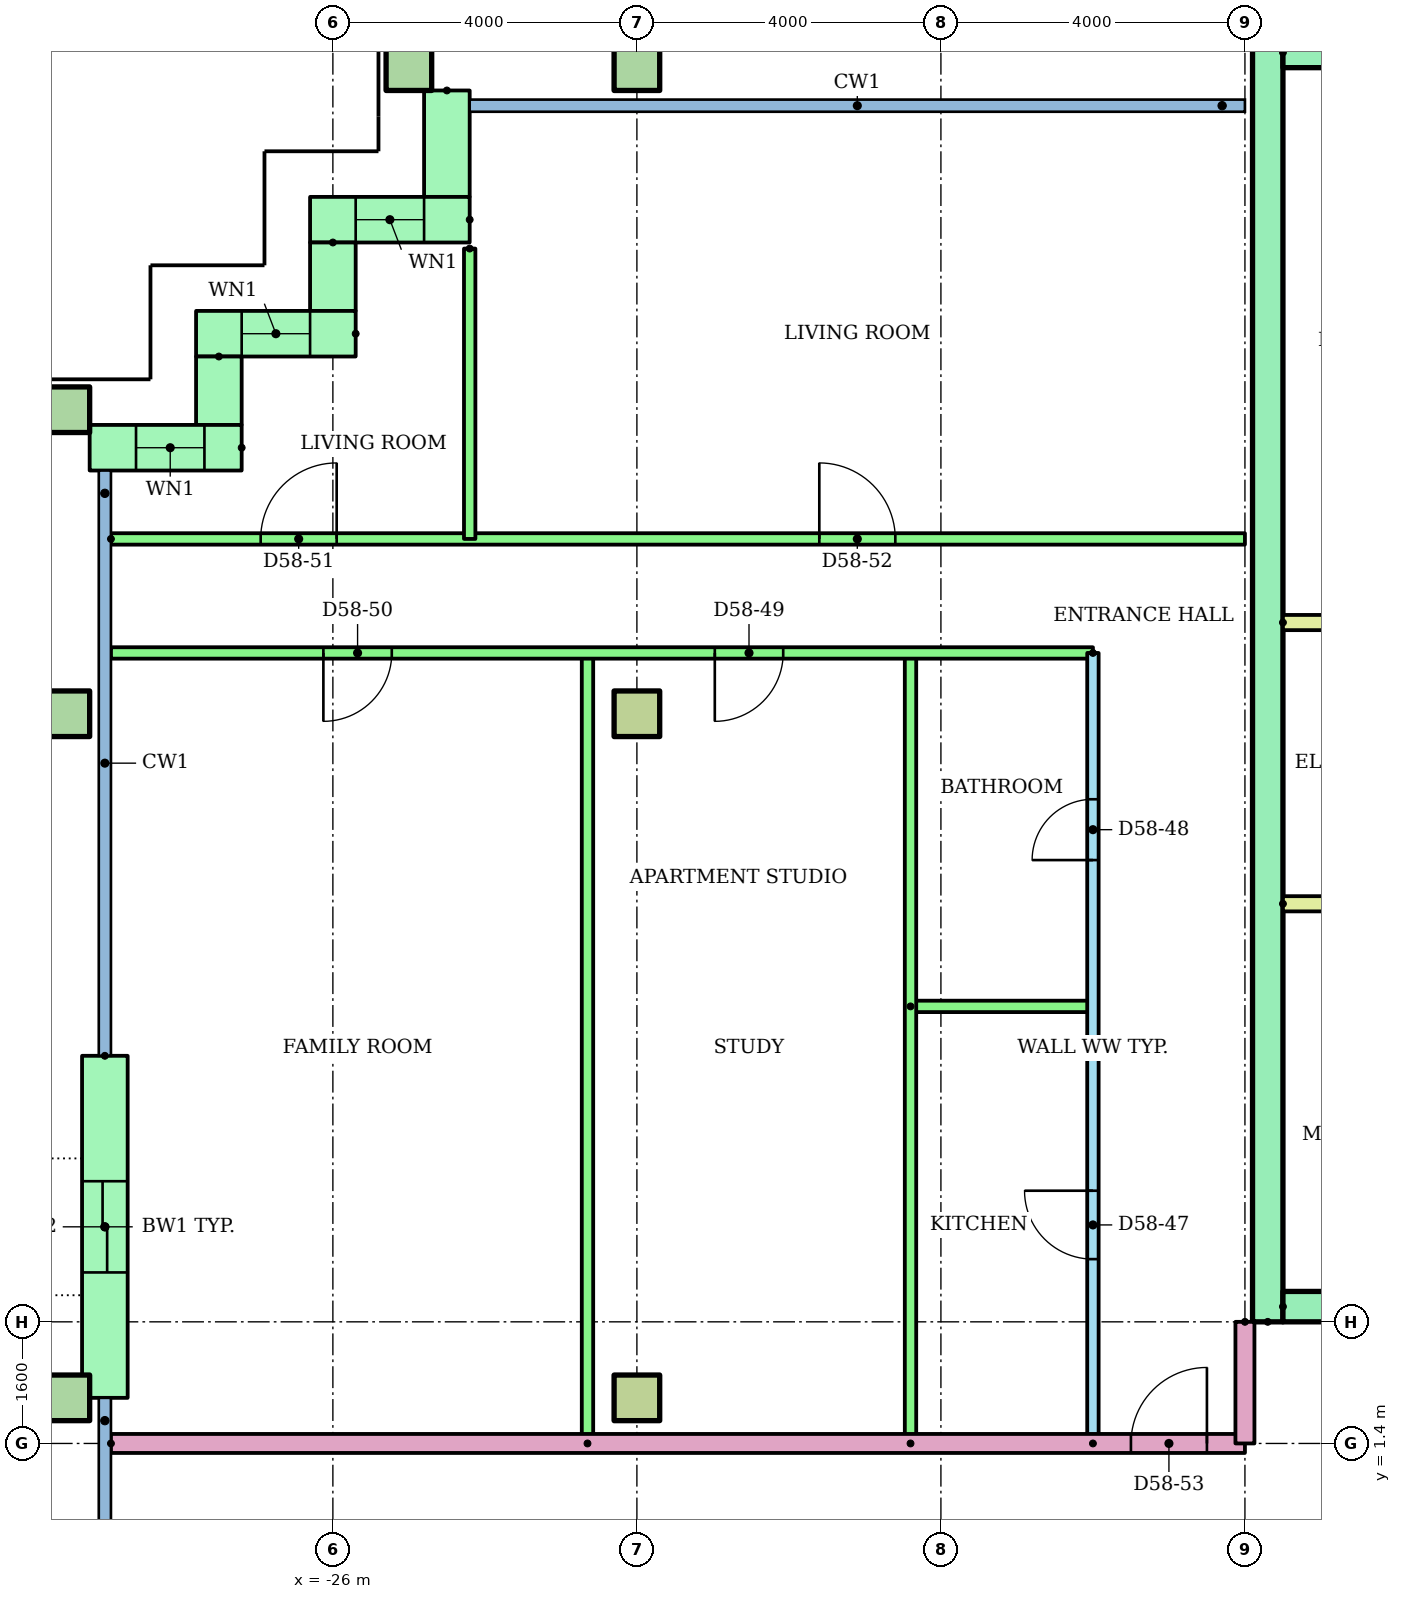
"""IFC4 building model, lengths in metres.
Left out: names, types, materials, properties, quantities, classifications, styles, units other than length and angle.
Written with IfcOpenShell. Run it as: python <this file> out.ifc"""

import sys

from ifc_helpers import new_model, si_unit, direction, frame, frame_2d, origin, origin_2d, place, context, subcontext, project, spatial, rectangle, hollow_rectangle, extrude, element, fill, save


model = new_model("IFC4")
c1 = context("Model", 3, precision=1e-05, world=origin(), true_north=direction((0.0, 1.0)))
c2 = subcontext(c1, "Body", "Model", "MODEL_VIEW")
j1 = project(units=[si_unit("LENGTHUNIT", "METRE"), si_unit("PLANEANGLEUNIT", "RADIAN")], contexts=[c1])
p1 = place(None, origin())
s1 = spatial("IfcSite", under=j1, at=p1, CompositionType="ELEMENT")
p2 = place(p1, origin())
s2 = spatial("IfcBuilding", under=s1, at=p2, CompositionType="ELEMENT")
p3 = place(p2, frame((0.0, 0.0, 223.6)))
s3 = spatial("IfcBuildingStorey", under=s2, at=p3, CompositionType="ELEMENT", Elevation=223.6)
p4 = place(p3, frame((-29.5, 2.0, 0.0)))
e1 = element("IfcColumn", 1, at=p4, inside=s3, PredefinedType="COLUMN", context=c2, shape_type="SweptSolid", body=[
    extrude(hollow_rectangle(XDim=0.6, YDim=0.6, WallThickness=0.03, at=origin_2d()), origin(), (0.0, 0.0, 1.0), 3.2),
])
p5 = place(p3, frame((-22.0, 2.0, 0.0)))
e2 = element("IfcColumn", 2, at=p5, inside=s3, PredefinedType="COLUMN", context=c2, shape_type="SweptSolid", body=[
    extrude(rectangle(XDim=0.6, YDim=0.6, at=origin_2d()), origin(), (0.0, 0.0, 1.0), 3.2),
])
p6 = place(p3, frame((-29.5, 11.0, 0.0)))
e3 = element("IfcColumn", 3, at=p6, inside=s3, PredefinedType="COLUMN", context=c2, shape_type="SweptSolid", body=[
    extrude(hollow_rectangle(XDim=0.6, YDim=0.6, WallThickness=0.03, at=origin_2d()), origin(), (0.0, 0.0, 1.0), 3.2),
])
p7 = place(p3, frame((-22.0, 11.0, 0.0)))
e4 = element("IfcColumn", 4, at=p7, inside=s3, PredefinedType="COLUMN", context=c2, shape_type="SweptSolid", body=[
    extrude(rectangle(XDim=0.6, YDim=0.6, at=origin_2d()), origin(), (0.0, 0.0, 1.0), 3.2),
])
for number, where in (
    (5, (-29.5, 15.0, 0.0)),
    (6, (-25.0, 19.5, 0.0)),
    (7, (-22.0, 19.5, 0.0)),
):
    element("IfcColumn", number, at=place(p3, frame(where)), inside=s3, PredefinedType="COLUMN", context=c2, shape_type="SweptSolid", body=[
        extrude(hollow_rectangle(XDim=0.6, YDim=0.6, WallThickness=0.03, at=origin_2d()), origin(), (0.0, 0.0, 1.0), 3.2),
    ])
p8 = place(p3, frame((-24.5, 19.2, 0.0), z_axis=(0.0, 0.0, 1.0), x_axis=(0.0, -1.0, 0.0)))
e8 = element("IfcWall", 8, at=p8, inside=s3, PredefinedType="STANDARD", context=c2, shape_type="SweptSolid", body=[
    extrude(rectangle(XDim=1.4, YDim=0.6, at=frame_2d((0.7, 0.0))), origin(), (0.0, 0.0, 1.0), 2.92),
])
p9 = place(p3, frame((-24.2, 17.5, 0.0), z_axis=(0.0, 0.0, 1.0), x_axis=(-1.0, 0.0, 0.0)))
e9 = element("IfcWall", 9, at=p9, inside=s3, PredefinedType="STANDARD", context=c2, shape_type="SweptSolid", body=[
    extrude(rectangle(XDim=2.1, YDim=0.6, at=frame_2d((1.05, 0.0))), origin(), (0.0, 0.0, 1.0), 2.92),
])
p10 = place(p9, frame((0.6, 0.0, 0.9)))
e10 = element("IfcOpeningElement", 10, at=p10, cuts=e9, PredefinedType="OPENING", context=c2, shape_type="SweptSolid", body=[
    extrude(rectangle(XDim=0.9, YDim=1.5, at=frame_2d((0.45, 0.75))), frame((0.0, 0.31, 0.0), z_axis=(0.0, -1.0, 0.0), x_axis=(1.0, 0.0, 0.0)), (0.0, 0.0, 1.0), 0.62),
])
p11 = place(p3, frame((-26.0, 17.2, 0.0), z_axis=(0.0, 0.0, 1.0), x_axis=(0.0, -1.0, 0.0)))
e11 = element("IfcWall", 11, at=p11, inside=s3, PredefinedType="STANDARD", context=c2, shape_type="SweptSolid", body=[
    extrude(rectangle(XDim=0.9, YDim=0.6, at=frame_2d((0.45, 0.0))), origin(), (0.0, 0.0, 1.0), 2.92),
])
p12 = place(p3, frame((-25.7, 16.0, 0.0), z_axis=(0.0, 0.0, 1.0), x_axis=(-1.0, 0.0, 0.0)))
e12 = element("IfcWall", 12, at=p12, inside=s3, PredefinedType="STANDARD", context=c2, shape_type="SweptSolid", body=[
    extrude(rectangle(XDim=2.1, YDim=0.6, at=frame_2d((1.05, 0.0))), origin(), (0.0, 0.0, 1.0), 2.92),
])
p13 = place(p12, frame((0.6, 0.0, 0.9)))
e13 = element("IfcOpeningElement", 13, at=p13, cuts=e12, PredefinedType="OPENING", context=c2, shape_type="SweptSolid", body=[
    extrude(rectangle(XDim=0.9, YDim=1.5, at=frame_2d((0.45, 0.75))), frame((0.0, 0.31, 0.0), z_axis=(0.0, -1.0, 0.0), x_axis=(1.0, 0.0, 0.0)), (0.0, 0.0, 1.0), 0.62),
])
p14 = place(p3, frame((-27.5, 15.7, 0.0), z_axis=(0.0, 0.0, 1.0), x_axis=(0.0, -1.0, 0.0)))
e14 = element("IfcWall", 14, at=p14, inside=s3, PredefinedType="STANDARD", context=c2, shape_type="SweptSolid", body=[
    extrude(rectangle(XDim=0.9, YDim=0.6, at=frame_2d((0.45, 0.0))), origin(), (0.0, 0.0, 1.0), 2.92),
])
p15 = place(p3, frame((-27.2, 14.5, 0.0), z_axis=(0.0, 0.0, 1.0), x_axis=(-1.0, 0.0, 0.0)))
e15 = element("IfcWall", 15, at=p15, inside=s3, PredefinedType="STANDARD", context=c2, shape_type="SweptSolid", body=[
    extrude(rectangle(XDim=2.0, YDim=0.6, at=frame_2d((1.0, 0.0))), origin(), (0.0, 0.0, 1.0), 2.92),
])
p16 = place(p15, frame((0.49, 0.0, 0.9)))
e16 = element("IfcOpeningElement", 16, at=p16, cuts=e15, PredefinedType="OPENING", context=c2, shape_type="SweptSolid", body=[
    extrude(rectangle(XDim=0.9, YDim=1.5, at=frame_2d((0.45, 0.75))), frame((0.0, 0.31, 0.0), z_axis=(0.0, -1.0, 0.0), x_axis=(1.0, 0.0, 0.0)), (0.0, 0.0, 1.0), 0.62),
])
p17 = place(p3, frame((-29.0, 6.5, 0.0), z_axis=(0.0, 0.0, 1.0), x_axis=(0.0, -1.0, 0.0)))
e17 = element("IfcWall", 17, at=p17, inside=s3, PredefinedType="STANDARD", context=c2, shape_type="SweptSolid", body=[
    extrude(rectangle(XDim=4.5, YDim=0.6, at=frame_2d((2.25, 0.0))), origin(), (0.0, 0.0, 1.0), 2.92),
])
p18 = place(p17, frame((1.65, 0.0, 0.0)))
e18 = element("IfcOpeningElement", 18, at=p18, cuts=e17, PredefinedType="OPENING", context=c2, shape_type="SweptSolid", body=[
    extrude(rectangle(XDim=1.2, YDim=2.1, at=frame_2d((0.6, 1.05))), frame((0.0, 0.31, 0.0), z_axis=(0.0, -1.0, 0.0), x_axis=(1.0, 0.0, 0.0)), (0.0, 0.0, 1.0), 0.62),
])
p19 = place(p3, frame((-13.7, 3.0, 0.0), z_axis=(0.0, 0.0, 1.0), x_axis=(0.0, 1.0, 0.0)))
e19 = element("IfcWall", 19, at=p19, inside=s3, PredefinedType="SHEAR", context=c2, shape_type="SweptSolid", body=[
    extrude(rectangle(XDim=17.0, YDim=0.4, at=frame_2d((8.5, 0.0))), origin(), (0.0, 0.0, 1.0), 2.92),
])
p20 = place(p3, frame((-13.5, 19.7, 0.0)))
e20 = element("IfcWall", 20, at=p20, inside=s3, PredefinedType="SHEAR", context=c2, shape_type="SweptSolid", body=[
    extrude(rectangle(XDim=27.0, YDim=0.4, at=frame_2d((13.5, 0.0))), origin(), (0.0, 0.0, 1.0), 2.92),
])
p21 = place(p3, frame((-13.5, 3.2, 0.0)))
e21 = element("IfcWall", 21, at=p21, inside=s3, PredefinedType="SHEAR", context=c2, shape_type="SweptSolid", body=[
    extrude(rectangle(XDim=27.0, YDim=0.4, at=frame_2d((13.5, 0.0))), origin(), (0.0, 0.0, 1.0), 2.92),
])
p22 = place(p21, frame((22.083, 0.0, 0.0)))
e22 = element("IfcOpeningElement", 22, at=p22, cuts=e21, PredefinedType="OPENING", context=c2, shape_type="SweptSolid", body=[
    extrude(rectangle(XDim=1.1, YDim=2.1, at=frame_2d((0.55, 1.05))), frame((0.0, 0.21, 0.0), z_axis=(0.0, -1.0, 0.0), x_axis=(1.0, 0.0, 0.0)), (0.0, 0.0, 1.0), 0.42),
])
p23 = place(p21, frame((25.128, 0.0, 0.0)))
e23 = element("IfcOpeningElement", 23, at=p23, cuts=e21, PredefinedType="OPENING", context=c2, shape_type="SweptSolid", body=[
    extrude(rectangle(XDim=1.1, YDim=2.1, at=frame_2d((0.55, 1.05))), frame((0.0, 0.21, 0.0), z_axis=(0.0, -1.0, 0.0), x_axis=(1.0, 0.0, 0.0)), (0.0, 0.0, 1.0), 0.42),
])
p24 = place(p21, frame((12.6, 0.0, 0.0)))
e24 = element("IfcOpeningElement", 24, at=p24, cuts=e21, PredefinedType="OPENING", context=c2, shape_type="SweptSolid", body=[
    extrude(rectangle(XDim=1.8, YDim=2.1, at=frame_2d((0.9, 1.05))), frame((0.0, 0.21, 0.0), z_axis=(0.0, -1.0, 0.0), x_axis=(1.0, 0.0, 0.0)), (0.0, 0.0, 1.0), 0.42),
])
for number, where in (
    (25, (-13.5, 8.5, 0.0)),
    (26, (-13.5, 12.2, 0.0)),
):
    element("IfcWall", number, at=place(p3, frame(where)), inside=s3, PredefinedType="PARTITIONING", context=c2, shape_type="SweptSolid", body=[
        extrude(rectangle(XDim=3.9, YDim=0.2, at=frame_2d((1.95, 0.0))), origin(), (0.0, 0.0, 1.0), 2.92),
    ])
p25 = place(p3, frame((-16.0, 1.4, 0.0), z_axis=(0.0, 0.0, 1.0), x_axis=(0.0, 1.0, 0.0)))
e27 = element("IfcWall", 27, at=p25, inside=s3, PredefinedType="PARTITIONING", context=c2, shape_type="SweptSolid", body=[
    extrude(rectangle(XDim=10.4, YDim=0.15, at=frame_2d((5.2, 0.0))), origin(), (0.0, 0.0, 1.0), 2.4),
])
p26 = place(p25, frame((2.425, 0.0, 0.0)))
e28 = element("IfcOpeningElement", 28, at=p26, cuts=e27, PredefinedType="OPENING", context=c2, shape_type="SweptSolid", body=[
    extrude(rectangle(XDim=0.9, YDim=2.1, at=frame_2d((0.45, 1.05))), frame((0.0, 0.085, 0.0), z_axis=(0.0, -1.0, 0.0), x_axis=(1.0, 0.0, 0.0)), (0.0, 0.0, 1.0), 0.17),
])
p27 = place(p25, frame((7.675, 0.0, 0.0)))
e29 = element("IfcOpeningElement", 29, at=p27, cuts=e27, PredefinedType="OPENING", context=c2, shape_type="SweptSolid", body=[
    extrude(rectangle(XDim=0.8, YDim=2.1, at=frame_2d((0.4, 1.05))), frame((0.0, 0.085, 0.0), z_axis=(0.0, -1.0, 0.0), x_axis=(1.0, 0.0, 0.0)), (0.0, 0.0, 1.0), 0.17),
])
p28 = place(p3, frame((-18.4, 7.15, 0.0)))
e30 = element("IfcWall", 30, at=p28, inside=s3, PredefinedType="PARTITIONING", context=c2, shape_type="SweptSolid", body=[
    extrude(rectangle(XDim=2.4, YDim=0.15, at=frame_2d((1.2, 0.0))), origin(), (0.0, 0.0, 1.0), 2.4),
])
for number, where, z_axis, x_axis in (
    (31, (-18.4, 1.4, 0.0), (0.0, 0.0, 1.0), (0.0, 1.0, 0.0)),
    (32, (-22.65, 1.4, 0.0), (0.0, 0.0, 1.0), (0.0, 1.0, 0.0)),
):
    element("IfcWall", number, at=place(p3, frame(where, z_axis=z_axis, x_axis=x_axis)), inside=s3, PredefinedType="PARTITIONING", context=c2, shape_type="SweptSolid", body=[
        extrude(rectangle(XDim=10.4, YDim=0.15, at=frame_2d((5.2, 0.0))), origin(), (0.0, 0.0, 1.0), 2.4),
    ])
p29 = place(p3, frame((-16.0, 11.8, 0.0), z_axis=(0.0, 0.0, 1.0), x_axis=(-1.0, 0.0, 0.0)))
e33 = element("IfcWall", 33, at=p29, inside=s3, PredefinedType="PARTITIONING", context=c2, shape_type="SweptSolid", body=[
    extrude(rectangle(XDim=12.92, YDim=0.15, at=frame_2d((6.46, 0.0))), origin(), (0.0, 0.0, 1.0), 2.4),
])
p30 = place(p29, frame((4.075, 0.0, 0.0)))
e34 = element("IfcOpeningElement", 34, at=p30, cuts=e33, PredefinedType="OPENING", context=c2, shape_type="SweptSolid", body=[
    extrude(rectangle(XDim=0.9, YDim=2.1, at=frame_2d((0.45, 1.05))), frame((0.0, 0.085, 0.0), z_axis=(0.0, -1.0, 0.0), x_axis=(1.0, 0.0, 0.0)), (0.0, 0.0, 1.0), 0.17),
])
p31 = place(p29, frame((9.225, 0.0, 0.0)))
e35 = element("IfcOpeningElement", 35, at=p31, cuts=e33, PredefinedType="OPENING", context=c2, shape_type="SweptSolid", body=[
    extrude(rectangle(XDim=0.9, YDim=2.1, at=frame_2d((0.45, 1.05))), frame((0.0, 0.085, 0.0), z_axis=(0.0, -1.0, 0.0), x_axis=(1.0, 0.0, 0.0)), (0.0, 0.0, 1.0), 0.17),
])
p32 = place(p3, frame((-28.92, 13.3, 0.0)))
e36 = element("IfcWall", 36, at=p32, inside=s3, PredefinedType="PARTITIONING", context=c2, shape_type="SweptSolid", body=[
    extrude(rectangle(XDim=14.92, YDim=0.15, at=frame_2d((7.46, 0.0))), origin(), (0.0, 0.0, 1.0), 2.4),
])
p33 = place(p32, frame((1.97, 0.0, 0.0)))
e37 = element("IfcOpeningElement", 37, at=p33, cuts=e36, PredefinedType="OPENING", context=c2, shape_type="SweptSolid", body=[
    extrude(rectangle(XDim=1.0, YDim=2.1, at=frame_2d((0.5, 1.05))), frame((0.0, 0.085, 0.0), z_axis=(0.0, -1.0, 0.0), x_axis=(1.0, 0.0, 0.0)), (0.0, 0.0, 1.0), 0.17),
])
p34 = place(p32, frame((9.32, 0.0, 0.0)))
e38 = element("IfcOpeningElement", 38, at=p34, cuts=e36, PredefinedType="OPENING", context=c2, shape_type="SweptSolid", body=[
    extrude(rectangle(XDim=1.0, YDim=2.1, at=frame_2d((0.5, 1.05))), frame((0.0, 0.085, 0.0), z_axis=(0.0, -1.0, 0.0), x_axis=(1.0, 0.0, 0.0)), (0.0, 0.0, 1.0), 0.17),
])
p35 = place(p3, frame((-24.2, 17.12, 0.0), z_axis=(0.0, 0.0, 1.0), x_axis=(0.0, -1.0, 0.0)))
e39 = element("IfcWall", 39, at=p35, inside=s3, PredefinedType="PARTITIONING", context=c2, shape_type="SweptSolid", body=[
    extrude(rectangle(XDim=3.82, YDim=0.15, at=frame_2d((1.91, 0.0))), origin(), (0.0, 0.0, 1.0), 2.4),
])
p36 = place(p3, frame((-28.92, 1.4, 0.0)))
e40 = element("IfcWall", 40, at=p36, inside=s3, PredefinedType="PARTITIONING", context=c2, shape_type="SweptSolid", body=[
    extrude(rectangle(XDim=14.92, YDim=0.25, at=frame_2d((7.46, 0.0))), origin(), (0.0, 0.0, 1.0), 2.4),
])
p37 = place(p36, frame((13.42, 0.0, 0.0)))
e41 = element("IfcOpeningElement", 41, at=p37, cuts=e40, PredefinedType="OPENING", context=c2, shape_type="SweptSolid", body=[
    extrude(rectangle(XDim=1.0, YDim=2.1, at=frame_2d((0.5, 1.05))), frame((0.0, 0.135, 0.0), z_axis=(0.0, -1.0, 0.0), x_axis=(1.0, 0.0, 0.0)), (0.0, 0.0, 1.0), 0.27),
])
p38 = place(p3, frame((-14.0, 3.0, 0.0), z_axis=(0.0, 0.0, 1.0), x_axis=(0.0, -1.0, 0.0)))
e42 = element("IfcWall", 42, at=p38, inside=s3, PredefinedType="PARTITIONING", context=c2, shape_type="SweptSolid", body=[
    extrude(rectangle(XDim=1.6, YDim=0.25, at=frame_2d((0.8, 0.0))), origin(), (0.0, 0.0, 1.0), 2.4),
])
p39 = place(p10, origin())
e43 = element("IfcWindow", 43, at=p39, inside=s3, PartitioningType="SINGLE_PANEL", PredefinedType="WINDOW", context=c2, shape_type="SweptSolid", body=[
    extrude(rectangle(XDim=0.9, YDim=1.5, at=frame_2d((0.45, 0.75))), frame((0.0, 0.03, 0.0), z_axis=(0.0, -1.0, 0.0), x_axis=(1.0, 0.0, 0.0)), (0.0, 0.0, 1.0), 0.06),
])
fill(e10, e43)
p40 = place(p13, origin())
e44 = element("IfcWindow", 44, at=p40, inside=s3, PartitioningType="SINGLE_PANEL", PredefinedType="WINDOW", context=c2, shape_type="SweptSolid", body=[
    extrude(rectangle(XDim=0.9, YDim=1.5, at=frame_2d((0.45, 0.75))), frame((0.0, 0.03, 0.0), z_axis=(0.0, -1.0, 0.0), x_axis=(1.0, 0.0, 0.0)), (0.0, 0.0, 1.0), 0.06),
])
fill(e13, e44)
p41 = place(p16, origin())
e45 = element("IfcWindow", 45, at=p41, inside=s3, PartitioningType="SINGLE_PANEL", PredefinedType="WINDOW", context=c2, shape_type="SweptSolid", body=[
    extrude(rectangle(XDim=0.9, YDim=1.5, at=frame_2d((0.45, 0.75))), frame((0.0, 0.03, 0.0), z_axis=(0.0, -1.0, 0.0), x_axis=(1.0, 0.0, 0.0)), (0.0, 0.0, 1.0), 0.06),
])
fill(e16, e45)
p42 = place(p26, origin())
e46 = element("IfcDoor", 46, at=p42, inside=s3, OperationType="SINGLE_SWING_RIGHT", PredefinedType="DOOR", context=c2, shape_type="SweptSolid", body=[
    extrude(rectangle(XDim=0.9, YDim=2.1, at=frame_2d((0.45, 1.05))), frame((0.0, 0.025, 0.0), z_axis=(0.0, -1.0, 0.0), x_axis=(1.0, 0.0, 0.0)), (0.0, 0.0, 1.0), 0.05),
])
fill(e28, e46)
p43 = place(p27, origin())
e47 = element("IfcDoor", 47, at=p43, inside=s3, OperationType="SINGLE_SWING_LEFT", PredefinedType="DOOR", context=c2, shape_type="SweptSolid", body=[
    extrude(rectangle(XDim=0.8, YDim=2.1, at=frame_2d((0.4, 1.05))), frame((0.0, 0.025, 0.0), z_axis=(0.0, -1.0, 0.0), x_axis=(1.0, 0.0, 0.0)), (0.0, 0.0, 1.0), 0.05),
])
fill(e29, e47)
p44 = place(p30, origin())
e48 = element("IfcDoor", 48, at=p44, inside=s3, OperationType="SINGLE_SWING_RIGHT", PredefinedType="DOOR", context=c2, shape_type="SweptSolid", body=[
    extrude(rectangle(XDim=0.9, YDim=2.1, at=frame_2d((0.45, 1.05))), frame((0.0, 0.025, 0.0), z_axis=(0.0, -1.0, 0.0), x_axis=(1.0, 0.0, 0.0)), (0.0, 0.0, 1.0), 0.05),
])
fill(e34, e48)
p45 = place(p31, origin())
e49 = element("IfcDoor", 49, at=p45, inside=s3, OperationType="SINGLE_SWING_RIGHT", PredefinedType="DOOR", context=c2, shape_type="SweptSolid", body=[
    extrude(rectangle(XDim=0.9, YDim=2.1, at=frame_2d((0.45, 1.05))), frame((0.0, 0.025, 0.0), z_axis=(0.0, -1.0, 0.0), x_axis=(1.0, 0.0, 0.0)), (0.0, 0.0, 1.0), 0.05),
])
fill(e35, e49)
p46 = place(p33, origin())
e50 = element("IfcDoor", 50, at=p46, inside=s3, OperationType="SINGLE_SWING_RIGHT", PredefinedType="DOOR", context=c2, shape_type="SweptSolid", body=[
    extrude(rectangle(XDim=1.0, YDim=2.1, at=frame_2d((0.5, 1.05))), frame((0.0, 0.025, 0.0), z_axis=(0.0, -1.0, 0.0), x_axis=(1.0, 0.0, 0.0)), (0.0, 0.0, 1.0), 0.05),
])
fill(e37, e50)
p47 = place(p34, origin())
e51 = element("IfcDoor", 51, at=p47, inside=s3, OperationType="SINGLE_SWING_LEFT", PredefinedType="DOOR", context=c2, shape_type="SweptSolid", body=[
    extrude(rectangle(XDim=1.0, YDim=2.1, at=frame_2d((0.5, 1.05))), frame((0.0, 0.025, 0.0), z_axis=(0.0, -1.0, 0.0), x_axis=(1.0, 0.0, 0.0)), (0.0, 0.0, 1.0), 0.05),
])
fill(e38, e51)
p48 = place(p37, origin())
e52 = element("IfcDoor", 52, at=p48, inside=s3, OperationType="SINGLE_SWING_RIGHT", PredefinedType="DOOR", context=c2, shape_type="SweptSolid", body=[
    extrude(rectangle(XDim=1.0, YDim=2.1, at=frame_2d((0.5, 1.05))), frame((0.0, 0.025, 0.0), z_axis=(0.0, -1.0, 0.0), x_axis=(1.0, 0.0, 0.0)), (0.0, 0.0, 1.0), 0.05),
])
fill(e41, e52)
p49 = place(p18, origin())
e53 = element("IfcDoor", 53, at=p49, inside=s3, OperationType="SLIDING_TO_LEFT", PredefinedType="DOOR", context=c2, shape_type="SweptSolid", body=[
    extrude(rectangle(XDim=1.2, YDim=2.1, at=frame_2d((0.6, 1.05))), frame((0.0, 0.025, 0.0), z_axis=(0.0, -1.0, 0.0), x_axis=(1.0, 0.0, 0.0)), (0.0, 0.0, 1.0), 0.05),
])
fill(e18, e53)
save(model, sys.argv[1])
